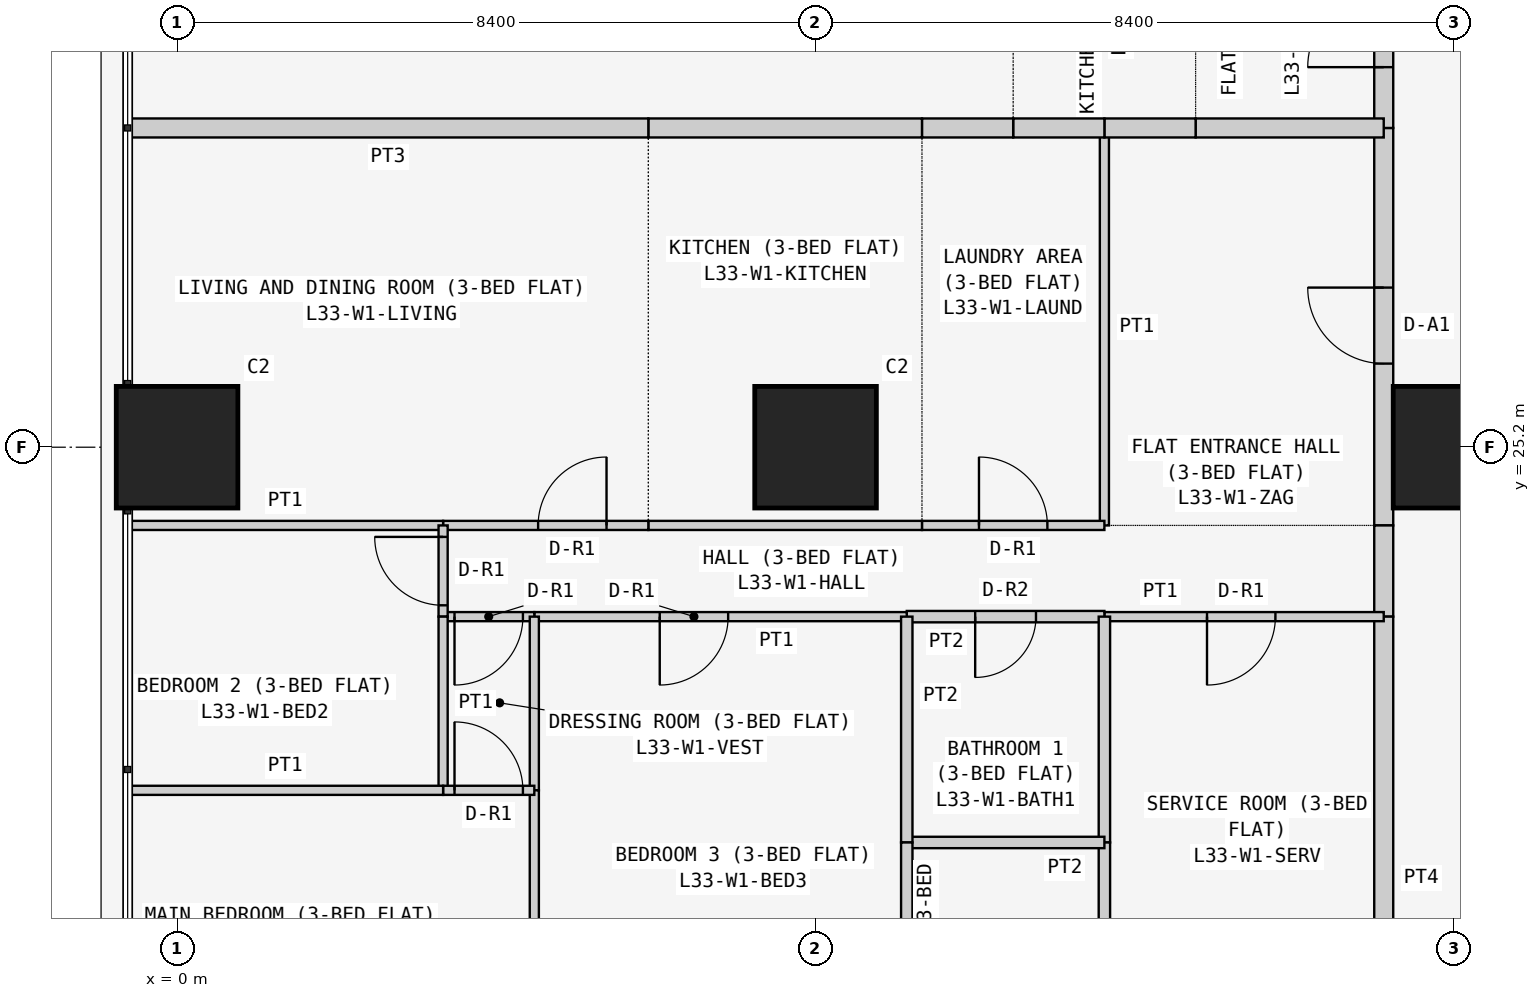
"""IFC4 building model, lengths in metres.
Left out: names, types, materials, properties, quantities, classifications, styles, units other than length and angle.
Written with IfcOpenShell. Run it as: python <this file> out.ifc"""

import sys

from ifc_helpers import new_model, si_unit, direction, frame, frame_2d, origin, origin_2d, place, context, subcontext, project, spatial, rectangle, extrude, element, fill, save


model = new_model("IFC4")
c1 = context("Model", 3, precision=1e-05, world=origin(), true_north=direction((0.0, 1.0)))
c2 = subcontext(c1, "Body", "Model", "MODEL_VIEW")
j1 = project(units=[si_unit("LENGTHUNIT", "METRE"), si_unit("PLANEANGLEUNIT", "RADIAN")], contexts=[c1])
p1 = place(None, origin())
s1 = spatial("IfcSite", under=j1, at=p1, CompositionType="ELEMENT")
p2 = place(p1, origin())
s2 = spatial("IfcBuilding", under=s1, at=p2, CompositionType="ELEMENT")
p3 = place(p2, frame((0.0, 0.0, 130.5)))
s3 = spatial("IfcBuildingStorey", under=s2, at=p3, CompositionType="ELEMENT", Elevation=130.5)
for number, where, z_axis, x_axis in (
    (1, (0.0, 25.2, 0.0), (0.0, 0.0, 1.0), (1.0, 0.0, 0.0)),
    (2, (8.4, 25.2, 0.0), (0.0, 0.0, 1.0), (1.0, 0.0, 0.0)),
    (3, (16.8, 25.2, 0.0), (0.0, 0.0, 1.0), (1.0, 0.0, 0.0)),
):
    element("IfcColumn", number, at=place(p3, frame(where, z_axis=z_axis, x_axis=x_axis)), inside=s3, PredefinedType="COLUMN", context=c2, shape_type="SweptSolid", body=[
        extrude(rectangle(XDim=1.6, YDim=1.6, at=origin_2d()), origin(), (0.0, 0.0, 1.0), 3.6),
    ])
p4 = place(p3, frame((15.875, 24.171, 0.0), z_axis=(0.0, 0.0, 1.0), x_axis=(0.0, 1.0, 0.0)))
e4 = element("IfcWall", 4, at=p4, inside=s3, PredefinedType="PARTITIONING", context=c2, shape_type="SweptSolid", body=[
    extrude(rectangle(XDim=5.229, YDim=0.25, at=frame_2d((2.615, 0.0))), origin(), (0.0, 0.0, 1.0), 3.45),
])
p5 = place(p4, frame((2.129, 0.0, 0.0)))
e5 = element("IfcOpeningElement", 5, at=p5, cuts=e4, PredefinedType="OPENING", context=c2, shape_type="SweptSolid", body=[
    extrude(rectangle(XDim=1.0, YDim=2.1, at=frame_2d((0.5, 1.05))), frame((0.0, 0.135, 0.0), z_axis=(0.0, -1.0, 0.0), x_axis=(1.0, 0.0, 0.0)), (0.0, 0.0, 1.0), 0.27),
])
p6 = place(p3, frame((15.875, 22.971, 0.0), z_axis=(0.0, 0.0, 1.0), x_axis=(0.0, 1.0, 0.0)))
e6 = element("IfcWall", 6, at=p6, inside=s3, PredefinedType="PARTITIONING", context=c2, shape_type="SweptSolid", body=[
    extrude(rectangle(XDim=1.2, YDim=0.25, at=frame_2d((0.6, 0.0))), origin(), (0.0, 0.0, 1.0), 3.45),
])
p7 = place(p3, frame((15.875, 16.1, 0.0), z_axis=(0.0, 0.0, 1.0), x_axis=(0.0, 1.0, 0.0)))
e7 = element("IfcWall", 7, at=p7, inside=s3, PredefinedType="PARTITIONING", context=c2, shape_type="SweptSolid", body=[
    extrude(rectangle(XDim=6.871, YDim=0.25, at=frame_2d((3.436, 0.0))), origin(), (0.0, 0.0, 1.0), 3.45),
])
p8 = place(p3, frame((15.875, 29.4, 0.0), z_axis=(0.0, 0.0, 1.0), x_axis=(0.0, 1.0, 0.0)))
e8 = element("IfcWall", 8, at=p8, inside=s3, PredefinedType="PARTITIONING", context=c2, shape_type="SweptSolid", body=[
    extrude(rectangle(XDim=2.6, YDim=0.25, at=frame_2d((1.3, 0.0))), origin(), (0.0, 0.0, 1.0), 3.45),
])
p9 = place(p8, frame((0.8, 0.0, 0.0)))
e9 = element("IfcOpeningElement", 9, at=p9, cuts=e8, PredefinedType="OPENING", context=c2, shape_type="SweptSolid", body=[
    extrude(rectangle(XDim=1.0, YDim=2.1, at=frame_2d((0.5, 1.05))), frame((0.0, 0.135, 0.0), z_axis=(0.0, -1.0, 0.0), x_axis=(1.0, 0.0, 0.0)), (0.0, 0.0, 1.0), 0.27),
])
p10 = place(p3, frame((12.2, 29.4, 0.0), z_axis=(0.0, 0.0, 1.0), x_axis=(0.0, -1.0, 0.0)))
e10 = element("IfcWall", 10, at=p10, inside=s3, PredefinedType="PARTITIONING", context=c2, shape_type="SweptSolid", body=[
    extrude(rectangle(XDim=5.229, YDim=0.12, at=frame_2d((2.615, 0.0))), origin(), (0.0, 0.0, 1.0), 3.45),
])
p11 = place(p3, frame((15.875, 29.4, 0.0), z_axis=(0.0, 0.0, 1.0), x_axis=(-1.0, 0.0, 0.0)))
e11 = element("IfcWall", 11, at=p11, inside=s3, PredefinedType="PARTITIONING", context=c2, shape_type="SweptSolid", body=[
    extrude(rectangle(XDim=2.475, YDim=0.25, at=frame_2d((1.238, 0.0))), origin(), (0.0, 0.0, 1.0), 3.45),
])
p12 = place(p3, frame((13.4, 29.4, 0.0), z_axis=(0.0, 0.0, 1.0), x_axis=(-1.0, 0.0, 0.0)))
e12 = element("IfcWall", 12, at=p12, inside=s3, PredefinedType="PARTITIONING", context=c2, shape_type="SweptSolid", body=[
    extrude(rectangle(XDim=1.2, YDim=0.25, at=frame_2d((0.6, 0.0))), origin(), (0.0, 0.0, 1.0), 3.45),
])
p13 = place(p3, frame((9.8, 24.171, 0.0), z_axis=(0.0, 0.0, 1.0), x_axis=(1.0, 0.0, 0.0)))
e13 = element("IfcWall", 13, at=p13, inside=s3, PredefinedType="PARTITIONING", context=c2, shape_type="SweptSolid", body=[
    extrude(rectangle(XDim=2.4, YDim=0.12, at=frame_2d((1.2, 0.0))), origin(), (0.0, 0.0, 1.0), 3.45),
])
p14 = place(p13, frame((0.75, 0.0, 0.0)))
e14 = element("IfcOpeningElement", 14, at=p14, cuts=e13, PredefinedType="OPENING", context=c2, shape_type="SweptSolid", body=[
    extrude(rectangle(XDim=0.9, YDim=2.1, at=frame_2d((0.45, 1.05))), frame((0.0, 0.07, 0.0), z_axis=(0.0, -1.0, 0.0), x_axis=(1.0, 0.0, 0.0)), (0.0, 0.0, 1.0), 0.14),
])
for number, where, z_axis, x_axis in (
    (15, (12.2, 29.4, 0.0), (0.0, 0.0, 1.0), (-1.0, 0.0, 0.0)),
    (16, (11.0, 29.4, 0.0), (0.0, 0.0, 1.0), (-1.0, 0.0, 0.0)),
):
    element("IfcWall", number, at=place(p3, frame(where, z_axis=z_axis, x_axis=x_axis)), inside=s3, PredefinedType="PARTITIONING", context=c2, shape_type="SweptSolid", body=[
        extrude(rectangle(XDim=1.2, YDim=0.25, at=frame_2d((0.6, 0.0))), origin(), (0.0, 0.0, 1.0), 3.45),
    ])
p15 = place(p3, frame((6.2, 24.171, 0.0), z_axis=(0.0, 0.0, 1.0), x_axis=(1.0, 0.0, 0.0)))
e17 = element("IfcWall", 17, at=p15, inside=s3, PredefinedType="PARTITIONING", context=c2, shape_type="SweptSolid", body=[
    extrude(rectangle(XDim=3.6, YDim=0.12, at=frame_2d((1.8, 0.0))), origin(), (0.0, 0.0, 1.0), 3.45),
])
p16 = place(p3, frame((9.8, 29.4, 0.0), z_axis=(0.0, 0.0, 1.0), x_axis=(-1.0, 0.0, 0.0)))
e18 = element("IfcWall", 18, at=p16, inside=s3, PredefinedType="PARTITIONING", context=c2, shape_type="SweptSolid", body=[
    extrude(rectangle(XDim=3.6, YDim=0.25, at=frame_2d((1.8, 0.0))), origin(), (0.0, 0.0, 1.0), 3.45),
])
p17 = place(p3, frame((3.5, 24.171, 0.0), z_axis=(0.0, 0.0, 1.0), x_axis=(1.0, 0.0, 0.0)))
e19 = element("IfcWall", 19, at=p17, inside=s3, PredefinedType="PARTITIONING", context=c2, shape_type="SweptSolid", body=[
    extrude(rectangle(XDim=2.7, YDim=0.12, at=frame_2d((1.35, 0.0))), origin(), (0.0, 0.0, 1.0), 3.45),
])
p18 = place(p17, frame((1.25, 0.0, 0.0)))
e20 = element("IfcOpeningElement", 20, at=p18, cuts=e19, PredefinedType="OPENING", context=c2, shape_type="SweptSolid", body=[
    extrude(rectangle(XDim=0.9, YDim=2.1, at=frame_2d((0.45, 1.05))), frame((0.0, 0.07, 0.0), z_axis=(0.0, -1.0, 0.0), x_axis=(1.0, 0.0, 0.0)), (0.0, 0.0, 1.0), 0.14),
])
p19 = place(p3, frame((-0.65, 24.171, 0.0), z_axis=(0.0, 0.0, 1.0), x_axis=(1.0, 0.0, 0.0)))
e21 = element("IfcWall", 21, at=p19, inside=s3, PredefinedType="PARTITIONING", context=c2, shape_type="SweptSolid", body=[
    extrude(rectangle(XDim=4.15, YDim=0.12, at=frame_2d((2.075, 0.0))), origin(), (0.0, 0.0, 1.0), 3.45),
])
p20 = place(p3, frame((6.2, 29.4, 0.0), z_axis=(0.0, 0.0, 1.0), x_axis=(-1.0, 0.0, 0.0)))
e22 = element("IfcWall", 22, at=p20, inside=s3, PredefinedType="PARTITIONING", context=c2, shape_type="SweptSolid", body=[
    extrude(rectangle(XDim=6.85, YDim=0.25, at=frame_2d((3.425, 0.0))), origin(), (0.0, 0.0, 1.0), 3.45),
])
p21 = place(p3, frame((12.2, 22.971, 0.0), z_axis=(0.0, 0.0, 1.0), x_axis=(1.0, 0.0, 0.0)))
e23 = element("IfcWall", 23, at=p21, inside=s3, PredefinedType="PARTITIONING", context=c2, shape_type="SweptSolid", body=[
    extrude(rectangle(XDim=3.675, YDim=0.12, at=frame_2d((1.837, 0.0))), origin(), (0.0, 0.0, 1.0), 3.45),
])
p22 = place(p21, frame((1.35, 0.0, 0.0)))
e24 = element("IfcOpeningElement", 24, at=p22, cuts=e23, PredefinedType="OPENING", context=c2, shape_type="SweptSolid", body=[
    extrude(rectangle(XDim=0.9, YDim=2.1, at=frame_2d((0.45, 1.05))), frame((0.0, 0.07, 0.0), z_axis=(0.0, -1.0, 0.0), x_axis=(1.0, 0.0, 0.0)), (0.0, 0.0, 1.0), 0.14),
])
p23 = place(p3, frame((9.6, 22.971, 0.0), z_axis=(0.0, 0.0, 1.0), x_axis=(1.0, 0.0, 0.0)))
e25 = element("IfcWall", 25, at=p23, inside=s3, PredefinedType="PARTITIONING", context=c2, shape_type="SweptSolid", body=[
    extrude(rectangle(XDim=2.6, YDim=0.15, at=frame_2d((1.3, 0.0))), origin(), (0.0, 0.0, 1.0), 3.45),
])
p24 = place(p23, frame((0.9, 0.0, 0.0)))
e26 = element("IfcOpeningElement", 26, at=p24, cuts=e25, PredefinedType="OPENING", context=c2, shape_type="SweptSolid", body=[
    extrude(rectangle(XDim=0.8, YDim=2.1, at=frame_2d((0.4, 1.05))), frame((0.0, 0.085, 0.0), z_axis=(0.0, -1.0, 0.0), x_axis=(1.0, 0.0, 0.0)), (0.0, 0.0, 1.0), 0.17),
])
p25 = place(p3, frame((4.7, 22.971, 0.0), z_axis=(0.0, 0.0, 1.0), x_axis=(1.0, 0.0, 0.0)))
e27 = element("IfcWall", 27, at=p25, inside=s3, PredefinedType="PARTITIONING", context=c2, shape_type="SweptSolid", body=[
    extrude(rectangle(XDim=4.9, YDim=0.12, at=frame_2d((2.45, 0.0))), origin(), (0.0, 0.0, 1.0), 3.45),
])
p26 = place(p25, frame((1.65, 0.0, 0.0)))
e28 = element("IfcOpeningElement", 28, at=p26, cuts=e27, PredefinedType="OPENING", context=c2, shape_type="SweptSolid", body=[
    extrude(rectangle(XDim=0.9, YDim=2.1, at=frame_2d((0.45, 1.05))), frame((0.0, 0.07, 0.0), z_axis=(0.0, -1.0, 0.0), x_axis=(1.0, 0.0, 0.0)), (0.0, 0.0, 1.0), 0.14),
])
p27 = place(p3, frame((3.5, 22.971, 0.0), z_axis=(0.0, 0.0, 1.0), x_axis=(1.0, 0.0, 0.0)))
e29 = element("IfcWall", 29, at=p27, inside=s3, PredefinedType="PARTITIONING", context=c2, shape_type="SweptSolid", body=[
    extrude(rectangle(XDim=1.2, YDim=0.12, at=frame_2d((0.6, 0.0))), origin(), (0.0, 0.0, 1.0), 3.45),
])
p28 = place(p27, frame((0.15, 0.0, 0.0)))
e30 = element("IfcOpeningElement", 30, at=p28, cuts=e29, PredefinedType="OPENING", context=c2, shape_type="SweptSolid", body=[
    extrude(rectangle(XDim=0.9, YDim=2.1, at=frame_2d((0.45, 1.05))), frame((0.0, 0.07, 0.0), z_axis=(0.0, -1.0, 0.0), x_axis=(1.0, 0.0, 0.0)), (0.0, 0.0, 1.0), 0.14),
])
p29 = place(p3, frame((3.5, 24.171, 0.0), z_axis=(0.0, 0.0, 1.0), x_axis=(0.0, -1.0, 0.0)))
e31 = element("IfcWall", 31, at=p29, inside=s3, PredefinedType="PARTITIONING", context=c2, shape_type="SweptSolid", body=[
    extrude(rectangle(XDim=1.2, YDim=0.12, at=frame_2d((0.6, 0.0))), origin(), (0.0, 0.0, 1.0), 3.45),
])
p30 = place(p29, frame((0.151, 0.0, 0.0)))
e32 = element("IfcOpeningElement", 32, at=p30, cuts=e31, PredefinedType="OPENING", context=c2, shape_type="SweptSolid", body=[
    extrude(rectangle(XDim=0.9, YDim=2.1, at=frame_2d((0.45, 1.05))), frame((0.0, 0.07, 0.0), z_axis=(0.0, -1.0, 0.0), x_axis=(1.0, 0.0, 0.0)), (0.0, 0.0, 1.0), 0.14),
])
p31 = place(p3, frame((12.2, 22.971, 0.0), z_axis=(0.0, 0.0, 1.0), x_axis=(0.0, -1.0, 0.0)))
e33 = element("IfcWall", 33, at=p31, inside=s3, PredefinedType="PARTITIONING", context=c2, shape_type="SweptSolid", body=[
    extrude(rectangle(XDim=2.971, YDim=0.15, at=frame_2d((1.485, 0.0))), origin(), (0.0, 0.0, 1.0), 3.45),
])
p32 = place(p3, frame((12.2, 20.0, 0.0), z_axis=(0.0, 0.0, 1.0), x_axis=(0.0, -1.0, 0.0)))
e34 = element("IfcWall", 34, at=p32, inside=s3, PredefinedType="PARTITIONING", context=c2, shape_type="SweptSolid", body=[
    extrude(rectangle(XDim=3.9, YDim=0.15, at=frame_2d((1.95, 0.0))), origin(), (0.0, 0.0, 1.0), 3.45),
])
p33 = place(p32, frame((1.45, 0.0, 0.0)))
e35 = element("IfcOpeningElement", 35, at=p33, cuts=e34, PredefinedType="OPENING", context=c2, shape_type="SweptSolid", body=[
    extrude(rectangle(XDim=0.8, YDim=2.1, at=frame_2d((0.4, 1.05))), frame((0.0, 0.085, 0.0), z_axis=(0.0, -1.0, 0.0), x_axis=(1.0, 0.0, 0.0)), (0.0, 0.0, 1.0), 0.17),
])
p34 = place(p3, frame((9.6, 20.0, 0.0), z_axis=(0.0, 0.0, 1.0), x_axis=(1.0, 0.0, 0.0)))
e36 = element("IfcWall", 36, at=p34, inside=s3, PredefinedType="PARTITIONING", context=c2, shape_type="SweptSolid", body=[
    extrude(rectangle(XDim=2.6, YDim=0.15, at=frame_2d((1.3, 0.0))), origin(), (0.0, 0.0, 1.0), 3.45),
])
p35 = place(p3, frame((9.6, 22.971, 0.0), z_axis=(0.0, 0.0, 1.0), x_axis=(0.0, -1.0, 0.0)))
e37 = element("IfcWall", 37, at=p35, inside=s3, PredefinedType="PARTITIONING", context=c2, shape_type="SweptSolid", body=[
    extrude(rectangle(XDim=2.971, YDim=0.15, at=frame_2d((1.485, 0.0))), origin(), (0.0, 0.0, 1.0), 3.45),
])
p36 = place(p3, frame((9.6, 20.0, 0.0), z_axis=(0.0, 0.0, 1.0), x_axis=(0.0, -1.0, 0.0)))
e38 = element("IfcWall", 38, at=p36, inside=s3, PredefinedType="PARTITIONING", context=c2, shape_type="SweptSolid", body=[
    extrude(rectangle(XDim=3.9, YDim=0.15, at=frame_2d((1.95, 0.0))), origin(), (0.0, 0.0, 1.0), 3.45),
])
p37 = place(p3, frame((4.7, 22.971, 0.0), z_axis=(0.0, 0.0, 1.0), x_axis=(0.0, -1.0, 0.0)))
e39 = element("IfcWall", 39, at=p37, inside=s3, PredefinedType="PARTITIONING", context=c2, shape_type="SweptSolid", body=[
    extrude(rectangle(XDim=2.285, YDim=0.12, at=frame_2d((1.143, 0.0))), origin(), (0.0, 0.0, 1.0), 3.45),
])
p38 = place(p3, frame((4.7, 20.686, 0.0), z_axis=(0.0, 0.0, 1.0), x_axis=(0.0, -1.0, 0.0)))
e40 = element("IfcWall", 40, at=p38, inside=s3, PredefinedType="PARTITIONING", context=c2, shape_type="SweptSolid", body=[
    extrude(rectangle(XDim=4.586, YDim=0.12, at=frame_2d((2.293, 0.0))), origin(), (0.0, 0.0, 1.0), 3.45),
])
p39 = place(p3, frame((3.5, 22.971, 0.0), z_axis=(0.0, 0.0, 1.0), x_axis=(0.0, -1.0, 0.0)))
e41 = element("IfcWall", 41, at=p39, inside=s3, PredefinedType="PARTITIONING", context=c2, shape_type="SweptSolid", body=[
    extrude(rectangle(XDim=2.285, YDim=0.12, at=frame_2d((1.143, 0.0))), origin(), (0.0, 0.0, 1.0), 3.45),
])
p40 = place(p3, frame((3.5, 20.686, 0.0), z_axis=(0.0, 0.0, 1.0), x_axis=(1.0, 0.0, 0.0)))
e42 = element("IfcWall", 42, at=p40, inside=s3, PredefinedType="PARTITIONING", context=c2, shape_type="SweptSolid", body=[
    extrude(rectangle(XDim=1.2, YDim=0.12, at=frame_2d((0.6, 0.0))), origin(), (0.0, 0.0, 1.0), 3.45),
])
p41 = place(p40, frame((0.15, 0.0, 0.0)))
e43 = element("IfcOpeningElement", 43, at=p41, cuts=e42, PredefinedType="OPENING", context=c2, shape_type="SweptSolid", body=[
    extrude(rectangle(XDim=0.9, YDim=2.1, at=frame_2d((0.45, 1.05))), frame((0.0, 0.07, 0.0), z_axis=(0.0, -1.0, 0.0), x_axis=(1.0, 0.0, 0.0)), (0.0, 0.0, 1.0), 0.14),
])
p42 = place(p3, frame((-0.65, 20.686, 0.0), z_axis=(0.0, 0.0, 1.0), x_axis=(1.0, 0.0, 0.0)))
e44 = element("IfcWall", 44, at=p42, inside=s3, PredefinedType="PARTITIONING", context=c2, shape_type="SweptSolid", body=[
    extrude(rectangle(XDim=4.15, YDim=0.12, at=frame_2d((2.075, 0.0))), origin(), (0.0, 0.0, 1.0), 3.45),
])
p43 = place(p5, origin())
e45 = element("IfcDoor", 45, at=p43, inside=s3, OperationType="SINGLE_SWING_RIGHT", PredefinedType="DOOR", context=c2, shape_type="SweptSolid", body=[
    extrude(rectangle(XDim=1.0, YDim=2.1, at=frame_2d((0.5, 1.05))), frame((0.0, 0.025, 0.0), z_axis=(0.0, -1.0, 0.0), x_axis=(1.0, 0.0, 0.0)), (0.0, 0.0, 1.0), 0.05),
])
fill(e5, e45)
p44 = place(p14, origin())
e46 = element("IfcDoor", 46, at=p44, inside=s3, OperationType="SINGLE_SWING_LEFT", PredefinedType="DOOR", context=c2, shape_type="SweptSolid", body=[
    extrude(rectangle(XDim=0.9, YDim=2.1, at=frame_2d((0.45, 1.05))), frame((0.0, 0.025, 0.0), z_axis=(0.0, -1.0, 0.0), x_axis=(1.0, 0.0, 0.0)), (0.0, 0.0, 1.0), 0.05),
])
fill(e14, e46)
p45 = place(p18, origin())
e47 = element("IfcDoor", 47, at=p45, inside=s3, OperationType="SINGLE_SWING_RIGHT", PredefinedType="DOOR", context=c2, shape_type="SweptSolid", body=[
    extrude(rectangle(XDim=0.9, YDim=2.1, at=frame_2d((0.45, 1.05))), frame((0.0, 0.025, 0.0), z_axis=(0.0, -1.0, 0.0), x_axis=(1.0, 0.0, 0.0)), (0.0, 0.0, 1.0), 0.05),
])
fill(e20, e47)
p46 = place(p22, frame((0.9, 0.0, 0.0), z_axis=(0.0, 0.0, 1.0), x_axis=(-1.0, 0.0, 0.0)))
e48 = element("IfcDoor", 48, at=p46, inside=s3, OperationType="SINGLE_SWING_RIGHT", PredefinedType="DOOR", context=c2, shape_type="SweptSolid", body=[
    extrude(rectangle(XDim=0.9, YDim=2.1, at=frame_2d((0.45, 1.05))), frame((0.0, 0.025, 0.0), z_axis=(0.0, -1.0, 0.0), x_axis=(1.0, 0.0, 0.0)), (0.0, 0.0, 1.0), 0.05),
])
fill(e24, e48)
p47 = place(p24, frame((0.8, 0.0, 0.0), z_axis=(0.0, 0.0, 1.0), x_axis=(-1.0, 0.0, 0.0)))
e49 = element("IfcDoor", 49, at=p47, inside=s3, OperationType="SINGLE_SWING_RIGHT", PredefinedType="DOOR", context=c2, shape_type="SweptSolid", body=[
    extrude(rectangle(XDim=0.8, YDim=2.1, at=frame_2d((0.4, 1.05))), frame((0.0, 0.025, 0.0), z_axis=(0.0, -1.0, 0.0), x_axis=(1.0, 0.0, 0.0)), (0.0, 0.0, 1.0), 0.05),
])
fill(e26, e49)
p48 = place(p26, frame((0.9, 0.0, 0.0), z_axis=(0.0, 0.0, 1.0), x_axis=(-1.0, 0.0, 0.0)))
e50 = element("IfcDoor", 50, at=p48, inside=s3, OperationType="SINGLE_SWING_RIGHT", PredefinedType="DOOR", context=c2, shape_type="SweptSolid", body=[
    extrude(rectangle(XDim=0.9, YDim=2.1, at=frame_2d((0.45, 1.05))), frame((0.0, 0.025, 0.0), z_axis=(0.0, -1.0, 0.0), x_axis=(1.0, 0.0, 0.0)), (0.0, 0.0, 1.0), 0.05),
])
fill(e28, e50)
p49 = place(p28, frame((0.9, 0.0, 0.0), z_axis=(0.0, 0.0, 1.0), x_axis=(-1.0, 0.0, 0.0)))
e51 = element("IfcDoor", 51, at=p49, inside=s3, OperationType="SINGLE_SWING_RIGHT", PredefinedType="DOOR", context=c2, shape_type="SweptSolid", body=[
    extrude(rectangle(XDim=0.9, YDim=2.1, at=frame_2d((0.45, 1.05))), frame((0.0, 0.025, 0.0), z_axis=(0.0, -1.0, 0.0), x_axis=(1.0, 0.0, 0.0)), (0.0, 0.0, 1.0), 0.05),
])
fill(e30, e51)
p50 = place(p41, origin())
e52 = element("IfcDoor", 52, at=p50, inside=s3, OperationType="SINGLE_SWING_LEFT", PredefinedType="DOOR", context=c2, shape_type="SweptSolid", body=[
    extrude(rectangle(XDim=0.9, YDim=2.1, at=frame_2d((0.45, 1.05))), frame((0.0, 0.025, 0.0), z_axis=(0.0, -1.0, 0.0), x_axis=(1.0, 0.0, 0.0)), (0.0, 0.0, 1.0), 0.05),
])
fill(e43, e52)
p51 = place(p30, frame((0.9, 0.0, 0.0), z_axis=(0.0, 0.0, 1.0), x_axis=(-1.0, 0.0, 0.0)))
e53 = element("IfcDoor", 53, at=p51, inside=s3, OperationType="SINGLE_SWING_RIGHT", PredefinedType="DOOR", context=c2, shape_type="SweptSolid", body=[
    extrude(rectangle(XDim=0.9, YDim=2.1, at=frame_2d((0.45, 1.05))), frame((0.0, 0.025, 0.0), z_axis=(0.0, -1.0, 0.0), x_axis=(1.0, 0.0, 0.0)), (0.0, 0.0, 1.0), 0.05),
])
fill(e32, e53)
p52 = place(p9, origin())
e54 = element("IfcDoor", 54, at=p52, inside=s3, OperationType="SINGLE_SWING_LEFT", PredefinedType="DOOR", context=c2, shape_type="SweptSolid", body=[
    extrude(rectangle(XDim=1.0, YDim=2.1, at=frame_2d((0.5, 1.05))), frame((0.0, 0.025, 0.0), z_axis=(0.0, -1.0, 0.0), x_axis=(1.0, 0.0, 0.0)), (0.0, 0.0, 1.0), 0.05),
])
fill(e9, e54)
save(model, sys.argv[1])
